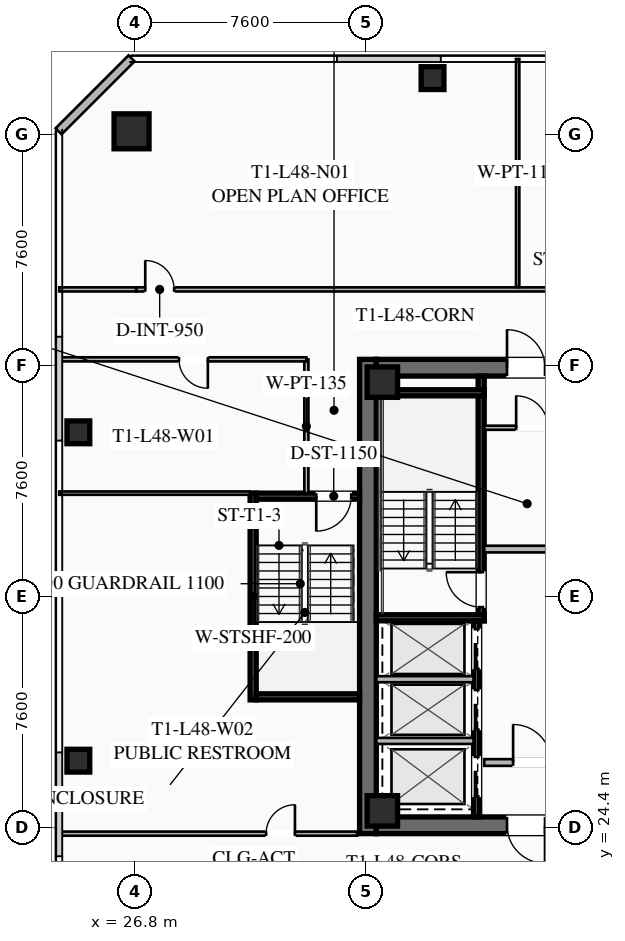
"""IFC4 building model, lengths in metres.
Left out: names, types, materials, properties, quantities, classifications, styles, units other than length and angle.
Written with IfcOpenShell. Run it as: python <this file> out.ifc"""

import sys

from ifc_helpers import new_model, si_unit, direction, frame, frame_2d, origin, origin_2d, place, context, subcontext, project, spatial, rectangle, hollow_rectangle, extrude, element, fill, save


model = new_model("IFC4")
c1 = context("Model", 3, precision=1e-05, world=origin(), true_north=direction((0.0, 1.0)))
c2 = subcontext(c1, "Body", "Model", "MODEL_VIEW")
j1 = project(units=[si_unit("LENGTHUNIT", "METRE"), si_unit("PLANEANGLEUNIT", "RADIAN")], contexts=[c1])
p1 = place(None, origin())
s1 = spatial("IfcSite", under=j1, at=p1, CompositionType="ELEMENT")
p2 = place(p1, origin())
s2 = spatial("IfcBuilding", under=s1, at=p2, CompositionType="ELEMENT")
p3 = place(p2, frame((0.0, 0.0, 178.3)))
s3 = spatial("IfcBuildingStorey", under=s2, at=p3, CompositionType="ELEMENT", Elevation=178.3)
p4 = place(p3, frame((34.475, 24.2, 0.0), z_axis=(0.0, 0.0, 1.0), x_axis=(0.0, 1.0, 0.0)))
e1 = element("IfcWall", 1, at=p4, inside=s3, PredefinedType="SHEAR", context=c2, shape_type="SweptSolid", body=[
    extrude(rectangle(XDim=15.6, YDim=0.55, at=frame_2d((7.8, 0.0))), origin(), (0.0, 0.0, 1.0), 3.55),
])
p5 = place(p3, frame((49.25, 24.475, 0.0), z_axis=(0.0, 0.0, 1.0), x_axis=(-1.0, 0.0, 0.0)))
e2 = element("IfcWall", 2, at=p5, inside=s3, PredefinedType="SHEAR", context=c2, shape_type="SweptSolid", body=[
    extrude(rectangle(XDim=14.5, YDim=0.55, at=frame_2d((7.25, 0.0))), origin(), (0.0, 0.0, 1.0), 3.55),
])
p6 = place(p5, frame((8.95, 0.0, 0.0)))
e3 = element("IfcOpeningElement", 3, at=p6, cuts=e2, PredefinedType="OPENING", context=c2, shape_type="SweptSolid", body=[
    extrude(rectangle(XDim=1.25, YDim=2.25, at=frame_2d((0.625, 1.125))), frame((0.0, 0.285, 0.0), z_axis=(0.0, -1.0, 0.0), x_axis=(1.0, 0.0, 0.0)), (0.0, 0.0, 1.0), 0.57),
])
p7 = place(p5, frame((3.9, 0.0, 0.0)))
e4 = element("IfcOpeningElement", 4, at=p7, cuts=e2, PredefinedType="OPENING", context=c2, shape_type="SweptSolid", body=[
    extrude(rectangle(XDim=1.25, YDim=2.25, at=frame_2d((0.625, 1.125))), frame((0.0, 0.285, 0.0), z_axis=(0.0, -1.0, 0.0), x_axis=(1.0, 0.0, 0.0)), (0.0, 0.0, 1.0), 0.57),
])
p8 = place(p3, frame((34.75, 39.525, 0.0), z_axis=(0.0, 0.0, 1.0), x_axis=(1.0, 0.0, 0.0)))
e5 = element("IfcWall", 5, at=p8, inside=s3, PredefinedType="SHEAR", context=c2, shape_type="SweptSolid", body=[
    extrude(rectangle(XDim=14.5, YDim=0.55, at=frame_2d((7.25, 0.0))), origin(), (0.0, 0.0, 1.0), 3.55),
])
p9 = place(p8, frame((4.3, 0.0, 0.0)))
e6 = element("IfcOpeningElement", 6, at=p9, cuts=e5, PredefinedType="OPENING", context=c2, shape_type="SweptSolid", body=[
    extrude(rectangle(XDim=1.25, YDim=2.25, at=frame_2d((0.625, 1.125))), frame((0.0, 0.285, 0.0), z_axis=(0.0, -1.0, 0.0), x_axis=(1.0, 0.0, 0.0)), (0.0, 0.0, 1.0), 0.57),
])
p10 = place(p8, frame((9.35, 0.0, 0.0)))
e7 = element("IfcOpeningElement", 7, at=p10, cuts=e5, PredefinedType="OPENING", context=c2, shape_type="SweptSolid", body=[
    extrude(rectangle(XDim=1.25, YDim=2.25, at=frame_2d((0.625, 1.125))), frame((0.0, 0.285, 0.0), z_axis=(0.0, -1.0, 0.0), x_axis=(1.0, 0.0, 0.0)), (0.0, 0.0, 1.0), 0.57),
])
for number, where, z_axis, x_axis in (
    (8, (34.95, 24.95, 0.0), (0.0, 0.0, 1.0), (1.0, 0.0, 0.0)),
    (9, (34.95, 39.05, 0.0), (0.0, 0.0, 1.0), (1.0, 0.0, 0.0)),
):
    element("IfcColumn", number, at=place(p3, frame(where, z_axis=z_axis, x_axis=x_axis)), inside=s3, PredefinedType="COLUMN", context=c2, shape_type="SweptSolid", body=[
        extrude(hollow_rectangle(XDim=1.0, YDim=1.0, WallThickness=0.04, at=origin_2d()), origin(), (0.0, 0.0, 1.0), 3.37),
    ])
p11 = place(p3, frame((26.7, 47.3, 0.0), z_axis=(0.0, 0.0, 1.0), x_axis=(1.0, 0.0, 0.0)))
e10 = element("IfcColumn", 10, at=p11, inside=s3, PredefinedType="COLUMN", context=c2, shape_type="SweptSolid", body=[
    extrude(hollow_rectangle(XDim=1.15, YDim=1.15, WallThickness=0.045, at=origin_2d()), origin(), (0.0, 0.0, 1.0), 3.37),
])
for number, where, z_axis, x_axis in (
    (11, (36.6, 49.05, 0.0), (0.0, 0.0, 1.0), (1.0, 0.0, 0.0)),
    (12, (24.95, 37.4, 0.0), (0.0, 0.0, 1.0), (1.0, 0.0, 0.0)),
    (13, (24.95, 26.6, 0.0), (0.0, 0.0, 1.0), (1.0, 0.0, 0.0)),
):
    element("IfcColumn", number, at=place(p3, frame(where, z_axis=z_axis, x_axis=x_axis)), inside=s3, PredefinedType="COLUMN", context=c2, shape_type="SweptSolid", body=[
        extrude(hollow_rectangle(XDim=0.75, YDim=0.75, WallThickness=0.032, at=origin_2d()), origin(), (0.0, 0.0, 1.0), 3.37),
    ])
p12 = place(p3, frame((24.3, 47.3, 0.0), z_axis=(0.0, 0.0, 1.0), x_axis=(0.707106781187, 0.707106781187, 0.0)))
e14 = element("IfcWall", 14, at=p12, inside=s3, PredefinedType="SOLIDWALL", context=c2, shape_type="SweptSolid", body=[
    extrude(rectangle(XDim=3.394, YDim=0.28, at=frame_2d((1.697, 0.0))), origin(), (0.0, 0.0, 1.0), 3.37),
])
p13 = place(p3, frame((38.2, 31.2, 0.0), z_axis=(0.0, 0.0, 1.0), x_axis=(0.0, 1.0, 0.0)))
e15 = element("IfcWall", 15, at=p13, inside=s3, PredefinedType="SHEAR", context=c2, shape_type="SweptSolid", body=[
    extrude(rectangle(XDim=8.05, YDim=0.2, at=frame_2d((4.025, 0.0))), origin(), (0.0, 0.0, 1.0), 3.37),
])
p14 = place(p13, frame((0.45, 0.0, 0.0)))
e16 = element("IfcOpeningElement", 16, at=p14, cuts=e15, PredefinedType="OPENING", context=c2, shape_type="SweptSolid", body=[
    extrude(rectangle(XDim=1.15, YDim=2.2, at=frame_2d((0.575, 1.1))), frame((0.0, 0.11, 0.0), z_axis=(0.0, -1.0, 0.0), x_axis=(1.0, 0.0, 0.0)), (0.0, 0.0, 1.0), 0.22),
])
for number, where, z_axis, x_axis in (
    (17, (34.75, 31.3, 0.0), (0.0, 0.0, 1.0), (1.0, 0.0, 0.0)),
    (18, (34.75, 38.7, 0.0), (0.0, 0.0, 1.0), (1.0, 0.0, 0.0)),
):
    element("IfcWall", number, at=place(p3, frame(where, z_axis=z_axis, x_axis=x_axis)), inside=s3, PredefinedType="SHEAR", context=c2, shape_type="SweptSolid", body=[
        extrude(rectangle(XDim=3.55, YDim=0.2, at=frame_2d((1.775, 0.0))), origin(), (0.0, 0.0, 1.0), 3.37),
    ])
p15 = place(p3, frame((38.3, 33.56, 0.0), z_axis=(0.0, 0.0, 1.0), x_axis=(1.0, 0.0, 0.0)))
e19 = element("IfcWall", 19, at=p15, inside=s3, PredefinedType="SOLIDWALL", context=c2, shape_type="SweptSolid", body=[
    extrude(rectangle(XDim=3.15, YDim=0.22, at=frame_2d((1.575, 0.0))), origin(), (0.0, 0.0, 1.0), 2.723),
])
p16 = place(p3, frame((38.3, 26.54, 0.0), z_axis=(0.0, 0.0, 1.0), x_axis=(1.0, 0.0, 0.0)))
e20 = element("IfcWall", 20, at=p16, inside=s3, PredefinedType="SOLIDWALL", context=c2, shape_type="SweptSolid", body=[
    extrude(rectangle(XDim=3.15, YDim=0.22, at=frame_2d((1.575, 0.0))), origin(), (0.0, 0.0, 1.0), 2.723),
])
p17 = place(p16, frame((0.95, 0.0, 0.0)))
e21 = element("IfcOpeningElement", 21, at=p17, cuts=e20, PredefinedType="OPENING", context=c2, shape_type="SweptSolid", body=[
    extrude(rectangle(XDim=1.25, YDim=2.25, at=frame_2d((0.625, 1.125))), frame((0.0, 0.12, 0.0), z_axis=(0.0, -1.0, 0.0), x_axis=(1.0, 0.0, 0.0)), (0.0, 0.0, 1.0), 0.24),
])
p18 = place(p3, frame((38.05, 24.75, 0.0), z_axis=(0.0, 0.0, 1.0), x_axis=(0.0, 1.0, 0.0)))
e22 = element("IfcWall", 22, at=p18, inside=s3, PredefinedType="SHEAR", context=c2, shape_type="SweptSolid", body=[
    extrude(rectangle(XDim=6.45, YDim=0.2, at=frame_2d((3.225, 0.0))), origin(), (0.0, 0.0, 1.0), 3.37),
])
p19 = place(p18, frame((4.875, 0.0, 0.0)))
e23 = element("IfcOpeningElement", 23, at=p19, cuts=e22, PredefinedType="OPENING", context=c2, shape_type="SweptSolid", body=[
    extrude(rectangle(XDim=1.3, YDim=2.25, at=frame_2d((0.65, 1.125))), frame((0.0, 0.11, 0.0), z_axis=(0.0, -1.0, 0.0), x_axis=(1.0, 0.0, 0.0)), (0.0, 0.0, 1.0), 0.22),
])
p20 = place(p18, frame((2.875, 0.0, 0.0)))
e24 = element("IfcOpeningElement", 24, at=p20, cuts=e22, PredefinedType="OPENING", context=c2, shape_type="SweptSolid", body=[
    extrude(rectangle(XDim=1.3, YDim=2.25, at=frame_2d((0.65, 1.125))), frame((0.0, 0.11, 0.0), z_axis=(0.0, -1.0, 0.0), x_axis=(1.0, 0.0, 0.0)), (0.0, 0.0, 1.0), 0.22),
])
p21 = place(p18, frame((0.675, 0.0, 0.0)))
e25 = element("IfcOpeningElement", 25, at=p21, cuts=e22, PredefinedType="OPENING", context=c2, shape_type="SweptSolid", body=[
    extrude(rectangle(XDim=1.3, YDim=2.25, at=frame_2d((0.65, 1.125))), frame((0.0, 0.11, 0.0), z_axis=(0.0, -1.0, 0.0), x_axis=(1.0, 0.0, 0.0)), (0.0, 0.0, 1.0), 0.22),
])
for number, where, z_axis, x_axis in (
    (26, (34.75, 27.25, 0.0), (0.0, 0.0, 1.0), (1.0, 0.0, 0.0)),
    (27, (34.75, 29.28, 0.0), (0.0, 0.0, 1.0), (1.0, 0.0, 0.0)),
):
    element("IfcWall", number, at=place(p3, frame(where, z_axis=z_axis, x_axis=x_axis)), inside=s3, PredefinedType="SOLIDWALL", context=c2, shape_type="SweptSolid", body=[
        extrude(rectangle(XDim=3.2, YDim=0.2, at=frame_2d((1.6, 0.0))), origin(), (0.0, 0.0, 1.0), 3.37),
    ])
p22 = place(p3, frame((38.3, 37.55, 0.0), z_axis=(0.0, 0.0, 1.0), x_axis=(1.0, 0.0, 0.0)))
e28 = element("IfcWall", 28, at=p22, inside=s3, PredefinedType="PARTITIONING", context=c2, shape_type="SweptSolid", body=[
    extrude(rectangle(XDim=3.15, YDim=0.135, at=frame_2d((1.575, 0.0))), origin(), (0.0, 0.0, 1.0), 2.723),
])
p23 = place(p22, frame((1.05, 0.0, 0.0)))
e29 = element("IfcOpeningElement", 29, at=p23, cuts=e28, PredefinedType="OPENING", context=c2, shape_type="SweptSolid", body=[
    extrude(rectangle(XDim=1.05, YDim=2.2, at=frame_2d((0.525, 1.1))), frame((0.0, 0.077, 0.0), z_axis=(0.0, -1.0, 0.0), x_axis=(1.0, 0.0, 0.0)), (0.0, 0.0, 1.0), 0.155),
])
p24 = place(p3, frame((30.7, 28.6, 0.0), z_axis=(0.0, 0.0, 1.0), x_axis=(0.0, 1.0, 0.0)))
e30 = element("IfcWall", 30, at=p24, inside=s3, PredefinedType="SHEAR", context=c2, shape_type="SweptSolid", body=[
    extrude(rectangle(XDim=6.8, YDim=0.2, at=frame_2d((3.4, 0.0))), origin(), (0.0, 0.0, 1.0), 3.37),
])
p25 = place(p3, frame((34.2, 35.3, 0.0), z_axis=(0.0, 0.0, 1.0), x_axis=(-1.0, 0.0, 0.0)))
e31 = element("IfcWall", 31, at=p25, inside=s3, PredefinedType="SHEAR", context=c2, shape_type="SweptSolid", body=[
    extrude(rectangle(XDim=3.4, YDim=0.2, at=frame_2d((1.7, 0.0))), origin(), (0.0, 0.0, 1.0), 3.37),
])
p26 = place(p25, frame((0.275, 0.0, 0.0)))
e32 = element("IfcOpeningElement", 32, at=p26, cuts=e31, PredefinedType="OPENING", context=c2, shape_type="SweptSolid", body=[
    extrude(rectangle(XDim=1.15, YDim=2.2, at=frame_2d((0.575, 1.1))), frame((0.0, 0.11, 0.0), z_axis=(0.0, -1.0, 0.0), x_axis=(1.0, 0.0, 0.0)), (0.0, 0.0, 1.0), 0.22),
])
p27 = place(p3, frame((30.8, 28.7, 0.0), z_axis=(0.0, 0.0, 1.0), x_axis=(1.0, 0.0, 0.0)))
e33 = element("IfcWall", 33, at=p27, inside=s3, PredefinedType="SHEAR", context=c2, shape_type="SweptSolid", body=[
    extrude(rectangle(XDim=3.4, YDim=0.2, at=frame_2d((1.7, 0.0))), origin(), (0.0, 0.0, 1.0), 3.37),
])
p28 = place(p3, frame((32.45, 35.4, 0.0), z_axis=(0.0, 0.0, 1.0), x_axis=(0.0, 1.0, 0.0)))
e34 = element("IfcWall", 34, at=p28, inside=s3, PredefinedType="PARTITIONING", context=c2, shape_type="SweptSolid", body=[
    extrude(rectangle(XDim=4.4, YDim=0.135, at=frame_2d((2.2, 0.0))), origin(), (0.0, 0.0, 1.0), 2.723),
])
p29 = place(p3, frame((26.85, 42.1, 0.0), z_axis=(0.0, 0.0, 1.0), x_axis=(1.0, 0.0, 0.0)))
e35 = element("IfcWall", 35, at=p29, inside=s3, PredefinedType="PARTITIONING", context=c2, shape_type="SweptSolid", body=[
    extrude(rectangle(XDim=30.3, YDim=0.135, at=frame_2d((15.15, 0.0))), origin(), (0.0, 0.0, 1.0), 2.723),
])
p30 = place(p29, frame((0.3, 0.0, 0.0)))
e36 = element("IfcOpeningElement", 36, at=p30, cuts=e35, PredefinedType="OPENING", context=c2, shape_type="SweptSolid", body=[
    extrude(rectangle(XDim=0.95, YDim=2.05, at=frame_2d((0.475, 1.025))), frame((0.0, 0.077, 0.0), z_axis=(0.0, -1.0, 0.0), x_axis=(1.0, 0.0, 0.0)), (0.0, 0.0, 1.0), 0.155),
])
p31 = place(p29, frame((29.05, 0.0, 0.0)))
e37 = element("IfcOpeningElement", 37, at=p31, cuts=e35, PredefinedType="OPENING", context=c2, shape_type="SweptSolid", body=[
    extrude(rectangle(XDim=0.95, YDim=2.05, at=frame_2d((0.475, 1.025))), frame((0.0, 0.077, 0.0), z_axis=(0.0, -1.0, 0.0), x_axis=(1.0, 0.0, 0.0)), (0.0, 0.0, 1.0), 0.155),
])
p32 = place(p3, frame((24.32, 42.1, 0.0), z_axis=(0.0, 0.0, 1.0), x_axis=(1.0, 0.0, 0.0)))
e38 = element("IfcWall", 38, at=p32, inside=s3, PredefinedType="PARTITIONING", context=c2, shape_type="SweptSolid", body=[
    extrude(rectangle(XDim=2.53, YDim=0.135, at=frame_2d((1.265, 0.0))), origin(), (0.0, 0.0, 1.0), 2.723),
])
p33 = place(p3, frame((39.4, 42.18, 0.0), z_axis=(0.0, 0.0, 1.0), x_axis=(0.0, 1.0, 0.0)))
e39 = element("IfcWall", 39, at=p33, inside=s3, PredefinedType="PARTITIONING", context=c2, shape_type="SweptSolid", body=[
    extrude(rectangle(XDim=7.5, YDim=0.11, at=frame_2d((3.75, 0.0))), origin(), (0.0, 0.0, 1.0), 2.723),
])
p34 = place(p3, frame((32.45, 39.8, 0.0), z_axis=(0.0, 0.0, 1.0), x_axis=(-1.0, 0.0, 0.0)))
e40 = element("IfcWall", 40, at=p34, inside=s3, PredefinedType="PARTITIONING", context=c2, shape_type="SweptSolid", body=[
    extrude(rectangle(XDim=8.13, YDim=0.135, at=frame_2d((4.065, 0.0))), origin(), (0.0, 0.0, 1.0), 2.723),
])
p35 = place(p34, frame((3.24, 0.0, 0.0)))
e41 = element("IfcOpeningElement", 41, at=p35, cuts=e40, PredefinedType="OPENING", context=c2, shape_type="SweptSolid", body=[
    extrude(rectangle(XDim=0.95, YDim=2.05, at=frame_2d((0.475, 1.025))), frame((0.0, 0.077, 0.0), z_axis=(0.0, -1.0, 0.0), x_axis=(1.0, 0.0, 0.0)), (0.0, 0.0, 1.0), 0.155),
])
p36 = place(p3, frame((24.32, 24.2, 0.0), z_axis=(0.0, 0.0, 1.0), x_axis=(1.0, 0.0, 0.0)))
e42 = element("IfcWall", 42, at=p36, inside=s3, PredefinedType="PARTITIONING", context=c2, shape_type="SweptSolid", body=[
    extrude(rectangle(XDim=9.8, YDim=0.135, at=frame_2d((4.9, 0.0))), origin(), (0.0, 0.0, 1.0), 2.723),
])
p37 = place(p36, frame((6.805, 0.0, 0.0)))
e43 = element("IfcOpeningElement", 43, at=p37, cuts=e42, PredefinedType="OPENING", context=c2, shape_type="SweptSolid", body=[
    extrude(rectangle(XDim=0.95, YDim=2.05, at=frame_2d((0.475, 1.025))), frame((0.0, 0.077, 0.0), z_axis=(0.0, -1.0, 0.0), x_axis=(1.0, 0.0, 0.0)), (0.0, 0.0, 1.0), 0.155),
])
p38 = place(p3, frame((30.6, 35.4, 0.0), z_axis=(0.0, 0.0, 1.0), x_axis=(-1.0, 0.0, 0.0)))
e44 = element("IfcWall", 44, at=p38, inside=s3, PredefinedType="PARTITIONING", context=c2, shape_type="SweptSolid", body=[
    extrude(rectangle(XDim=6.28, YDim=0.11, at=frame_2d((3.14, 0.0))), origin(), (0.0, 0.0, 1.0), 2.723),
])
p39 = place(p9, origin())
e45 = element("IfcDoor", 45, at=p39, inside=s3, OperationType="SINGLE_SWING_LEFT", PredefinedType="DOOR", context=c2, shape_type="SweptSolid", body=[
    extrude(rectangle(XDim=1.25, YDim=2.25, at=frame_2d((0.625, 1.125))), frame((0.0, 0.025, 0.0), z_axis=(0.0, -1.0, 0.0), x_axis=(1.0, 0.0, 0.0)), (0.0, 0.0, 1.0), 0.05),
])
fill(e6, e45)
p40 = place(p6, origin())
e46 = element("IfcDoor", 46, at=p40, inside=s3, OperationType="SINGLE_SWING_LEFT", PredefinedType="DOOR", context=c2, shape_type="SweptSolid", body=[
    extrude(rectangle(XDim=1.25, YDim=2.25, at=frame_2d((0.625, 1.125))), frame((0.0, 0.025, 0.0), z_axis=(0.0, -1.0, 0.0), x_axis=(1.0, 0.0, 0.0)), (0.0, 0.0, 1.0), 0.05),
])
fill(e3, e46)
p41 = place(p14, origin())
e47 = element("IfcDoor", 47, at=p41, inside=s3, OperationType="SINGLE_SWING_RIGHT", PredefinedType="DOOR", context=c2, shape_type="SweptSolid", body=[
    extrude(rectangle(XDim=1.15, YDim=2.2, at=frame_2d((0.575, 1.1))), frame((0.0, 0.025, 0.0), z_axis=(0.0, -1.0, 0.0), x_axis=(1.0, 0.0, 0.0)), (0.0, 0.0, 1.0), 0.05),
])
fill(e16, e47)
p42 = place(p17, origin())
e48 = element("IfcDoor", 48, at=p42, inside=s3, OperationType="SINGLE_SWING_LEFT", PredefinedType="DOOR", context=c2, shape_type="SweptSolid", body=[
    extrude(rectangle(XDim=1.25, YDim=2.25, at=frame_2d((0.625, 1.125))), frame((0.0, 0.025, 0.0), z_axis=(0.0, -1.0, 0.0), x_axis=(1.0, 0.0, 0.0)), (0.0, 0.0, 1.0), 0.05),
])
fill(e21, e48)
p43 = place(p23, origin())
e49 = element("IfcDoor", 49, at=p43, inside=s3, OperationType="SINGLE_SWING_LEFT", PredefinedType="DOOR", context=c2, shape_type="SweptSolid", body=[
    extrude(rectangle(XDim=1.05, YDim=2.2, at=frame_2d((0.525, 1.1))), frame((0.0, 0.025, 0.0), z_axis=(0.0, -1.0, 0.0), x_axis=(1.0, 0.0, 0.0)), (0.0, 0.0, 1.0), 0.05),
])
fill(e29, e49)
p44 = place(p26, origin())
e50 = element("IfcDoor", 50, at=p44, inside=s3, OperationType="SINGLE_SWING_RIGHT", PredefinedType="DOOR", context=c2, shape_type="SweptSolid", body=[
    extrude(rectangle(XDim=1.15, YDim=2.2, at=frame_2d((0.575, 1.1))), frame((0.0, 0.025, 0.0), z_axis=(0.0, -1.0, 0.0), x_axis=(1.0, 0.0, 0.0)), (0.0, 0.0, 1.0), 0.05),
])
fill(e32, e50)
p45 = place(p30, origin())
e51 = element("IfcDoor", 51, at=p45, inside=s3, OperationType="SINGLE_SWING_LEFT", PredefinedType="DOOR", context=c2, shape_type="SweptSolid", body=[
    extrude(rectangle(XDim=0.95, YDim=2.05, at=frame_2d((0.475, 1.025))), frame((0.0, 0.025, 0.0), z_axis=(0.0, -1.0, 0.0), x_axis=(1.0, 0.0, 0.0)), (0.0, 0.0, 1.0), 0.05),
])
fill(e36, e51)
p46 = place(p35, origin())
e52 = element("IfcDoor", 52, at=p46, inside=s3, OperationType="SINGLE_SWING_LEFT", PredefinedType="DOOR", context=c2, shape_type="SweptSolid", body=[
    extrude(rectangle(XDim=0.95, YDim=2.05, at=frame_2d((0.475, 1.025))), frame((0.0, 0.025, 0.0), z_axis=(0.0, -1.0, 0.0), x_axis=(1.0, 0.0, 0.0)), (0.0, 0.0, 1.0), 0.05),
])
fill(e41, e52)
p47 = place(p37, origin())
e53 = element("IfcDoor", 53, at=p47, inside=s3, OperationType="SINGLE_SWING_RIGHT", PredefinedType="DOOR", context=c2, shape_type="SweptSolid", body=[
    extrude(rectangle(XDim=0.95, YDim=2.05, at=frame_2d((0.475, 1.025))), frame((0.0, 0.025, 0.0), z_axis=(0.0, -1.0, 0.0), x_axis=(1.0, 0.0, 0.0)), (0.0, 0.0, 1.0), 0.05),
])
fill(e43, e53)
p48 = place(p19, origin())
e54 = element("IfcDoor", 54, at=p48, inside=s3, OperationType="SLIDING_TO_LEFT", PredefinedType="DOOR", context=c2, shape_type="SweptSolid", body=[
    extrude(rectangle(XDim=1.3, YDim=2.25, at=frame_2d((0.65, 1.125))), frame((0.0, 0.025, 0.0), z_axis=(0.0, -1.0, 0.0), x_axis=(1.0, 0.0, 0.0)), (0.0, 0.0, 1.0), 0.05),
])
fill(e23, e54)
p49 = place(p20, origin())
e55 = element("IfcDoor", 55, at=p49, inside=s3, OperationType="SLIDING_TO_LEFT", PredefinedType="DOOR", context=c2, shape_type="SweptSolid", body=[
    extrude(rectangle(XDim=1.3, YDim=2.25, at=frame_2d((0.65, 1.125))), frame((0.0, 0.025, 0.0), z_axis=(0.0, -1.0, 0.0), x_axis=(1.0, 0.0, 0.0)), (0.0, 0.0, 1.0), 0.05),
])
fill(e24, e55)
p50 = place(p21, origin())
e56 = element("IfcDoor", 56, at=p50, inside=s3, OperationType="SLIDING_TO_LEFT", PredefinedType="DOOR", context=c2, shape_type="SweptSolid", body=[
    extrude(rectangle(XDim=1.3, YDim=2.25, at=frame_2d((0.65, 1.125))), frame((0.0, 0.025, 0.0), z_axis=(0.0, -1.0, 0.0), x_axis=(1.0, 0.0, 0.0)), (0.0, 0.0, 1.0), 0.05),
])
fill(e25, e56)
save(model, sys.argv[1])
